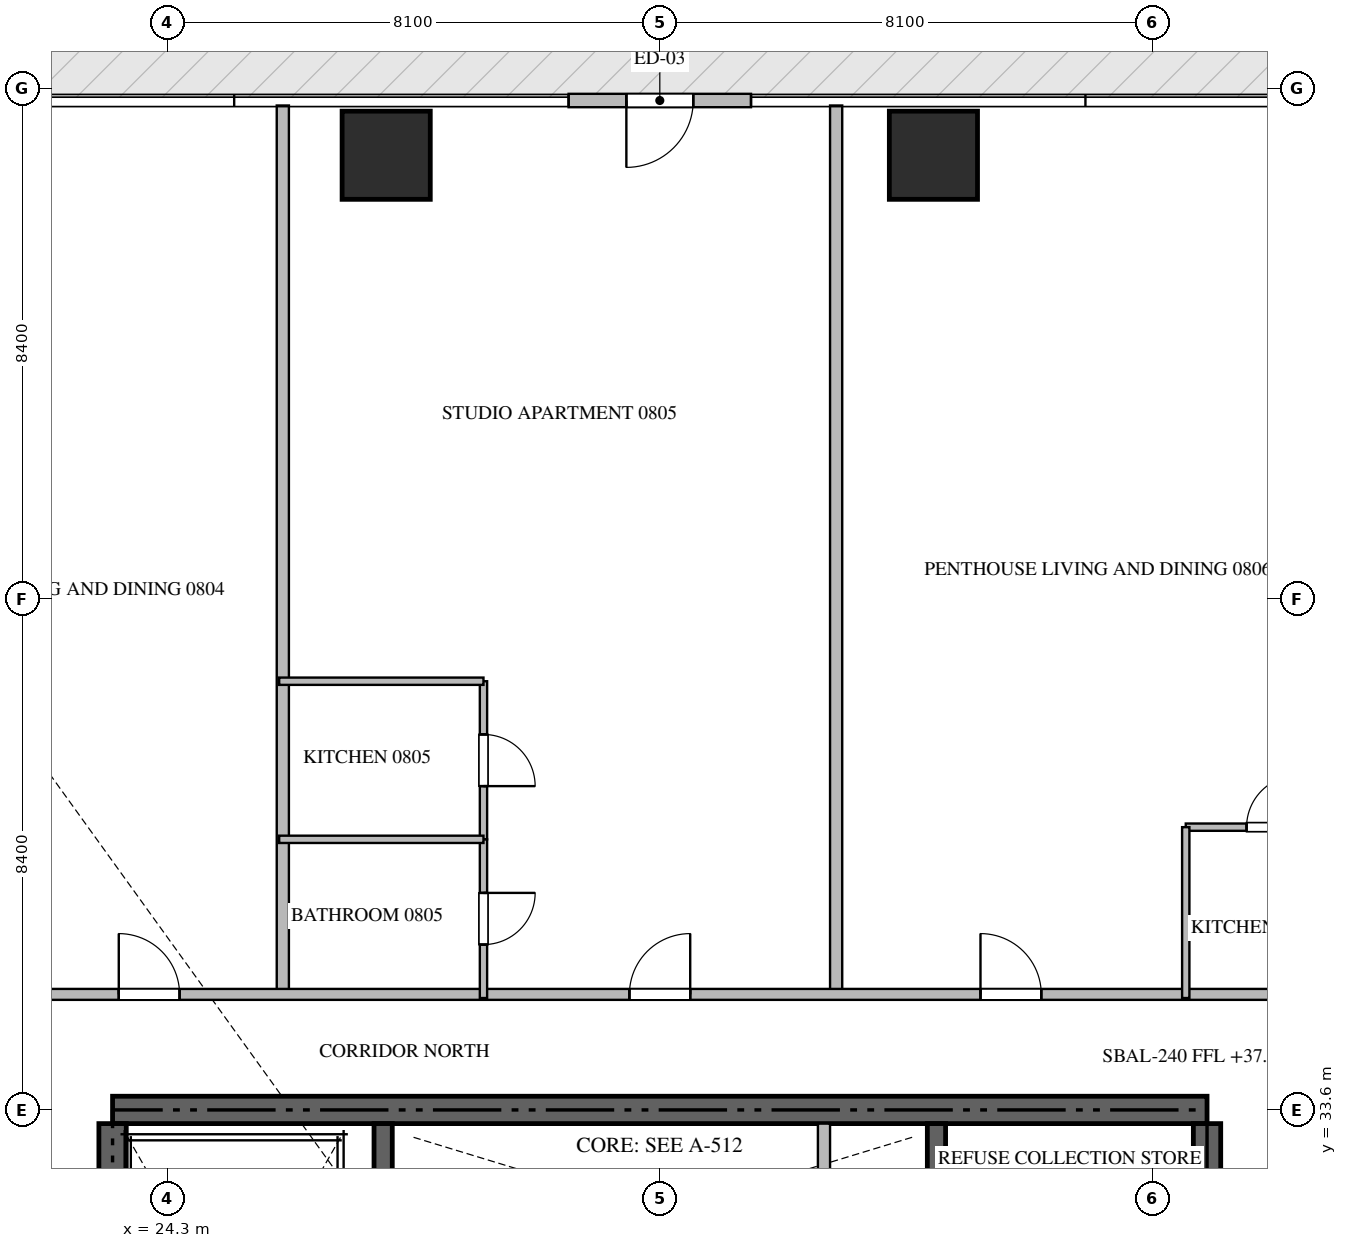
"""IFC4 building model, lengths in metres.
Left out: names, types, materials, properties, quantities, classifications, styles, units other than length and angle.
Written with IfcOpenShell. Run it as: python <this file> out.ifc"""

import sys

from ifc_helpers import new_model, si_unit, direction, frame, frame_2d, origin, origin_2d, place, context, subcontext, project, spatial, rectangle, extrude, source, transform, mapped, element, fill, save


model = new_model("IFC4")
c1 = context("Model", 3, precision=1e-05, world=origin(), true_north=direction((0.0, 1.0)))
c2 = subcontext(c1, "Body", "Model", "MODEL_VIEW")
j1 = project(units=[si_unit("LENGTHUNIT", "METRE"), si_unit("PLANEANGLEUNIT", "RADIAN")], contexts=[c1])
p1 = place(None, origin())
s1 = spatial("IfcSite", under=j1, at=p1, CompositionType="ELEMENT")
p2 = place(p1, origin())
s2 = spatial("IfcBuilding", under=s1, at=p2, CompositionType="ELEMENT")
p3 = place(p2, frame((0.0, 0.0, 37.95)))
s3 = spatial("IfcBuildingStorey", under=s2, at=p3, CompositionType="ELEMENT", Elevation=37.95)
p4 = place(p3, frame((41.4, 33.6, -0.26), z_axis=(0.0, 0.0, 1.0), x_axis=(-1.0, 0.0, 0.0)))
e1 = element("IfcWall", 1, at=p4, inside=s3, PredefinedType="SHEAR", context=c2, shape_type="SweptSolid", body=[
    extrude(rectangle(XDim=18.0, YDim=0.45, at=frame_2d((9.0, 0.0))), origin(), (0.0, 0.0, 1.0), 3.748),
])
p5 = place(p3, frame((23.4, 24.25, -0.26), z_axis=(0.0, 0.0, 1.0), x_axis=(0.0, 1.0, 0.0)))
e2 = element("IfcWall", 2, at=p5, inside=s3, PredefinedType="SHEAR", context=c2, shape_type="SweptSolid", body=[
    extrude(rectangle(XDim=9.125, YDim=0.45, at=frame_2d((4.562, 0.0))), origin(), (0.0, 0.0, 1.0), 3.748),
])
p6 = place(p3, frame((41.4, 27.75, -0.26), z_axis=(0.0, 0.0, 1.0), x_axis=(0.0, 1.0, 0.0)))
e3 = element("IfcWall", 3, at=p6, inside=s3, PredefinedType="SHEAR", context=c2, shape_type="SweptSolid", body=[
    extrude(rectangle(XDim=5.625, YDim=0.45, at=frame_2d((2.812, 0.0))), origin(), (0.0, 0.0, 1.0), 3.748),
])
p7 = place(p3, frame((27.85, 23.55, -0.26), z_axis=(0.0, 0.0, 1.0), x_axis=(0.0, 1.0, 0.0)))
e4 = element("IfcWall", 4, at=p7, inside=s3, PredefinedType="SHEAR", context=c2, shape_type="SweptSolid", body=[
    extrude(rectangle(XDim=9.825, YDim=0.3, at=frame_2d((4.913, 0.0))), origin(), (0.0, 0.0, 1.0), 3.748),
])
p8 = place(p3, frame((36.95, 27.05, -0.26), z_axis=(0.0, 0.0, 1.0), x_axis=(0.0, 1.0, 0.0)))
e5 = element("IfcWall", 5, at=p8, inside=s3, PredefinedType="SHEAR", context=c2, shape_type="SweptSolid", body=[
    extrude(rectangle(XDim=6.325, YDim=0.3, at=frame_2d((3.163, 0.0))), origin(), (0.0, 0.0, 1.0), 3.748),
])
m1 = source(origin(), c2, "Body", "SweptSolid", [
    extrude(rectangle(XDim=1.45, YDim=1.45, at=origin_2d()), origin(), (0.0, 0.0, 1.0), 3.75),
])
for number, where, z_axis, x_axis in (
    (6, (27.9, 49.3, -0.26), (0.0, 0.0, 1.0), (1.0, 0.0, 0.0)),
    (7, (36.9, 49.3, -0.26), (0.0, 0.0, 1.0), (1.0, 0.0, 0.0)),
):
    element("IfcColumn", number, at=place(p3, frame(where, z_axis=z_axis, x_axis=x_axis)), inside=s3, PredefinedType="COLUMN", context=c2, shape_type="MappedRepresentation", body=[
        mapped(m1, transform((0.0, 0.0, 0.0), scale=1.0)),
    ])
p9 = place(p3, frame((33.9, 50.2, 0.0), z_axis=(0.0, 0.0, 1.0), x_axis=(-1.0, 0.0, 0.0)))
e8 = element("IfcWall", 8, at=p9, inside=s3, PredefinedType="ELEMENTEDWALL", context=c2, shape_type="SweptSolid", body=[
    extrude(rectangle(XDim=3.0, YDim=0.22, at=frame_2d((1.5, 0.0))), origin(), (0.0, 0.0, 1.0), 3.475),
])
p10 = place(p9, frame((0.95, 0.0, 0.0)))
e9 = element("IfcOpeningElement", 9, at=p10, cuts=e8, PredefinedType="OPENING", context=c2, shape_type="SweptSolid", body=[
    extrude(rectangle(XDim=1.1, YDim=2.2, at=frame_2d((0.55, 1.1))), frame((0.0, 0.12, 0.0), z_axis=(0.0, -1.0, 0.0), x_axis=(1.0, 0.0, 0.0)), (0.0, 0.0, 1.0), 0.24),
])
p11 = place(p3, frame((35.1, 30.75, 0.0), z_axis=(0.0, 0.0, 1.0), x_axis=(0.0, 1.0, 0.0)))
e10 = element("IfcWall", 10, at=p11, inside=s3, PredefinedType="STANDARD", context=c2, shape_type="SweptSolid", body=[
    extrude(rectangle(XDim=2.625, YDim=0.2, at=frame_2d((1.312, 0.0))), origin(), (0.0, 0.0, 1.0), 3.49),
])
for number, where, z_axis, x_axis in (
    (11, (26.2, 35.5, 0.0), (0.0, 0.0, 1.0), (0.0, 1.0, 0.0)),
    (12, (35.3, 35.5, 0.0), (0.0, 0.0, 1.0), (0.0, 1.0, 0.0)),
):
    element("IfcWall", number, at=place(p3, frame(where, z_axis=z_axis, x_axis=x_axis)), inside=s3, PredefinedType="PARTITIONING", context=c2, shape_type="SweptSolid", body=[
        extrude(rectangle(XDim=14.618, YDim=0.2, at=frame_2d((7.309, 0.0))), origin(), (0.0, 0.0, 1.0), 3.49),
    ])
p12 = place(p3, frame((21.402, 35.5, 0.0), z_axis=(0.0, 0.0, 1.0), x_axis=(1.0, 0.0, 0.0)))
e13 = element("IfcWall", 13, at=p12, inside=s3, PredefinedType="PARTITIONING", context=c2, shape_type="SweptSolid", body=[
    extrude(rectangle(XDim=21.996, YDim=0.18, at=frame_2d((10.998, 0.0))), origin(), (0.0, 0.0, 1.0), 3.49),
])
p13 = place(p12, frame((2.1, 0.0, 0.0)))
e14 = element("IfcOpeningElement", 14, at=p13, cuts=e13, PredefinedType="OPENING", context=c2, shape_type="SweptSolid", body=[
    extrude(rectangle(XDim=1.0, YDim=2.15, at=frame_2d((0.5, 1.075))), frame((0.0, 0.1, 0.0), z_axis=(0.0, -1.0, 0.0), x_axis=(1.0, 0.0, 0.0)), (0.0, 0.0, 1.0), 0.2),
])
p14 = place(p12, frame((10.498, 0.0, 0.0)))
e15 = element("IfcOpeningElement", 15, at=p14, cuts=e13, PredefinedType="OPENING", context=c2, shape_type="SweptSolid", body=[
    extrude(rectangle(XDim=1.0, YDim=2.15, at=frame_2d((0.5, 1.075))), frame((0.0, 0.1, 0.0), z_axis=(0.0, -1.0, 0.0), x_axis=(1.0, 0.0, 0.0)), (0.0, 0.0, 1.0), 0.2),
])
p15 = place(p12, frame((16.272, 0.0, 0.0)))
e16 = element("IfcOpeningElement", 16, at=p15, cuts=e13, PredefinedType="OPENING", context=c2, shape_type="SweptSolid", body=[
    extrude(rectangle(XDim=1.0, YDim=2.15, at=frame_2d((0.5, 1.075))), frame((0.0, 0.1, 0.0), z_axis=(0.0, -1.0, 0.0), x_axis=(1.0, 0.0, 0.0)), (0.0, 0.0, 1.0), 0.2),
])
p16 = place(p3, frame((29.5, 40.65, 0.0), z_axis=(0.0, 0.0, 1.0), x_axis=(0.0, -1.0, 0.0)))
e17 = element("IfcWall", 17, at=p16, inside=s3, PredefinedType="PARTITIONING", context=c2, shape_type="SweptSolid", body=[
    extrude(rectangle(XDim=2.6, YDim=0.12, at=frame_2d((1.3, 0.0))), origin(), (0.0, 0.0, 1.0), 3.49),
])
p17 = place(p16, frame((0.875, 0.0, 0.0)))
e18 = element("IfcOpeningElement", 18, at=p17, cuts=e17, PredefinedType="OPENING", context=c2, shape_type="SweptSolid", body=[
    extrude(rectangle(XDim=0.85, YDim=2.1, at=frame_2d((0.425, 1.05))), frame((0.0, 0.07, 0.0), z_axis=(0.0, -1.0, 0.0), x_axis=(1.0, 0.0, 0.0)), (0.0, 0.0, 1.0), 0.14),
])
p18 = place(p3, frame((29.5, 38.048, 0.0), z_axis=(0.0, 0.0, 1.0), x_axis=(0.0, -1.0, 0.0)))
e19 = element("IfcWall", 19, at=p18, inside=s3, PredefinedType="PARTITIONING", context=c2, shape_type="SweptSolid", body=[
    extrude(rectangle(XDim=2.608, YDim=0.12, at=frame_2d((1.304, 0.0))), origin(), (0.0, 0.0, 1.0), 3.49),
])
p19 = place(p18, frame((0.879, 0.0, 0.0)))
e20 = element("IfcOpeningElement", 20, at=p19, cuts=e19, PredefinedType="OPENING", context=c2, shape_type="SweptSolid", body=[
    extrude(rectangle(XDim=0.85, YDim=2.1, at=frame_2d((0.425, 1.05))), frame((0.0, 0.07, 0.0), z_axis=(0.0, -1.0, 0.0), x_axis=(1.0, 0.0, 0.0)), (0.0, 0.0, 1.0), 0.14),
])
for number, where, z_axis, x_axis in (
    (21, (26.14, 38.05, 0.0), (0.0, 0.0, 1.0), (1.0, 0.0, 0.0)),
    (22, (26.14, 40.65, 0.0), (0.0, 0.0, 1.0), (1.0, 0.0, 0.0)),
):
    element("IfcWall", number, at=place(p3, frame(where, z_axis=z_axis, x_axis=x_axis)), inside=s3, PredefinedType="PARTITIONING", context=c2, shape_type="SweptSolid", body=[
        extrude(rectangle(XDim=3.36, YDim=0.12, at=frame_2d((1.68, 0.0))), origin(), (0.0, 0.0, 1.0), 3.49),
    ])
p20 = place(p3, frame((41.05, 38.25, 0.0), z_axis=(0.0, 0.0, 1.0), x_axis=(1.0, 0.0, 0.0)))
e23 = element("IfcWall", 23, at=p20, inside=s3, PredefinedType="PARTITIONING", context=c2, shape_type="SweptSolid", body=[
    extrude(rectangle(XDim=2.85, YDim=0.12, at=frame_2d((1.425, 0.0))), origin(), (0.0, 0.0, 1.0), 3.49),
])
p21 = place(p20, frame((1.0, 0.0, 0.0)))
e24 = element("IfcOpeningElement", 24, at=p21, cuts=e23, PredefinedType="OPENING", context=c2, shape_type="SweptSolid", body=[
    extrude(rectangle(XDim=0.85, YDim=2.1, at=frame_2d((0.425, 1.05))), frame((0.0, 0.07, 0.0), z_axis=(0.0, -1.0, 0.0), x_axis=(1.0, 0.0, 0.0)), (0.0, 0.0, 1.0), 0.14),
])
p22 = place(p3, frame((41.05, 38.25, 0.0), z_axis=(0.0, 0.0, 1.0), x_axis=(0.0, -1.0, 0.0)))
e25 = element("IfcWall", 25, at=p22, inside=s3, PredefinedType="PARTITIONING", context=c2, shape_type="SweptSolid", body=[
    extrude(rectangle(XDim=2.81, YDim=0.12, at=frame_2d((1.405, 0.0))), origin(), (0.0, 0.0, 1.0), 3.49),
])
m2 = source(origin(), c2, "Body", "SweptSolid", [
    extrude(rectangle(XDim=1.1, YDim=2.2, at=frame_2d((0.55, 1.1))), frame((0.0, 0.025, 0.0), z_axis=(0.0, -1.0, 0.0), x_axis=(1.0, 0.0, 0.0)), (0.0, 0.0, 1.0), 0.05),
])
p23 = place(p10, origin())
e26 = element("IfcDoor", 26, at=p23, inside=s3, OperationType="SINGLE_SWING_RIGHT", PredefinedType="DOOR", context=c2, shape_type="MappedRepresentation", body=[
    mapped(m2, transform((0.0, 0.0, 0.0), scale=1.0)),
])
fill(e9, e26)
m3 = source(origin(), c2, "Body", "SweptSolid", [
    extrude(rectangle(XDim=1.0, YDim=2.15, at=frame_2d((0.5, 1.075))), frame((0.0, 0.025, 0.0), z_axis=(0.0, -1.0, 0.0), x_axis=(1.0, 0.0, 0.0)), (0.0, 0.0, 1.0), 0.05),
])
p24 = place(p13, origin())
e27 = element("IfcDoor", 27, at=p24, inside=s3, OperationType="SINGLE_SWING_LEFT", PredefinedType="DOOR", context=c2, shape_type="MappedRepresentation", body=[
    mapped(m3, transform((0.0, 0.0, 0.0), scale=1.0)),
])
fill(e14, e27)
p25 = place(p14, origin())
e28 = element("IfcDoor", 28, at=p25, inside=s3, OperationType="SINGLE_SWING_RIGHT", PredefinedType="DOOR", context=c2, shape_type="MappedRepresentation", body=[
    mapped(m3, transform((0.0, 0.0, 0.0), scale=1.0)),
])
fill(e15, e28)
p26 = place(p15, origin())
e29 = element("IfcDoor", 29, at=p26, inside=s3, OperationType="SINGLE_SWING_LEFT", PredefinedType="DOOR", context=c2, shape_type="MappedRepresentation", body=[
    mapped(m3, transform((0.0, 0.0, 0.0), scale=1.0)),
])
fill(e16, e29)
m4 = source(origin(), c2, "Body", "SweptSolid", [
    extrude(rectangle(XDim=0.85, YDim=2.1, at=frame_2d((0.425, 1.05))), frame((0.0, 0.025, 0.0), z_axis=(0.0, -1.0, 0.0), x_axis=(1.0, 0.0, 0.0)), (0.0, 0.0, 1.0), 0.05),
])
p27 = place(p17, origin())
e30 = element("IfcDoor", 30, at=p27, inside=s3, OperationType="SINGLE_SWING_RIGHT", PredefinedType="DOOR", context=c2, shape_type="MappedRepresentation", body=[
    mapped(m4, transform((0.0, 0.0, 0.0), scale=1.0)),
])
fill(e18, e30)
p28 = place(p19, origin())
e31 = element("IfcDoor", 31, at=p28, inside=s3, OperationType="SINGLE_SWING_LEFT", PredefinedType="DOOR", context=c2, shape_type="MappedRepresentation", body=[
    mapped(m4, transform((0.0, 0.0, 0.0), scale=1.0)),
])
fill(e20, e31)
p29 = place(p21, origin())
e32 = element("IfcDoor", 32, at=p29, inside=s3, OperationType="SINGLE_SWING_RIGHT", PredefinedType="DOOR", context=c2, shape_type="MappedRepresentation", body=[
    mapped(m4, transform((0.0, 0.0, 0.0), scale=1.0)),
])
fill(e24, e32)
save(model, sys.argv[1])
